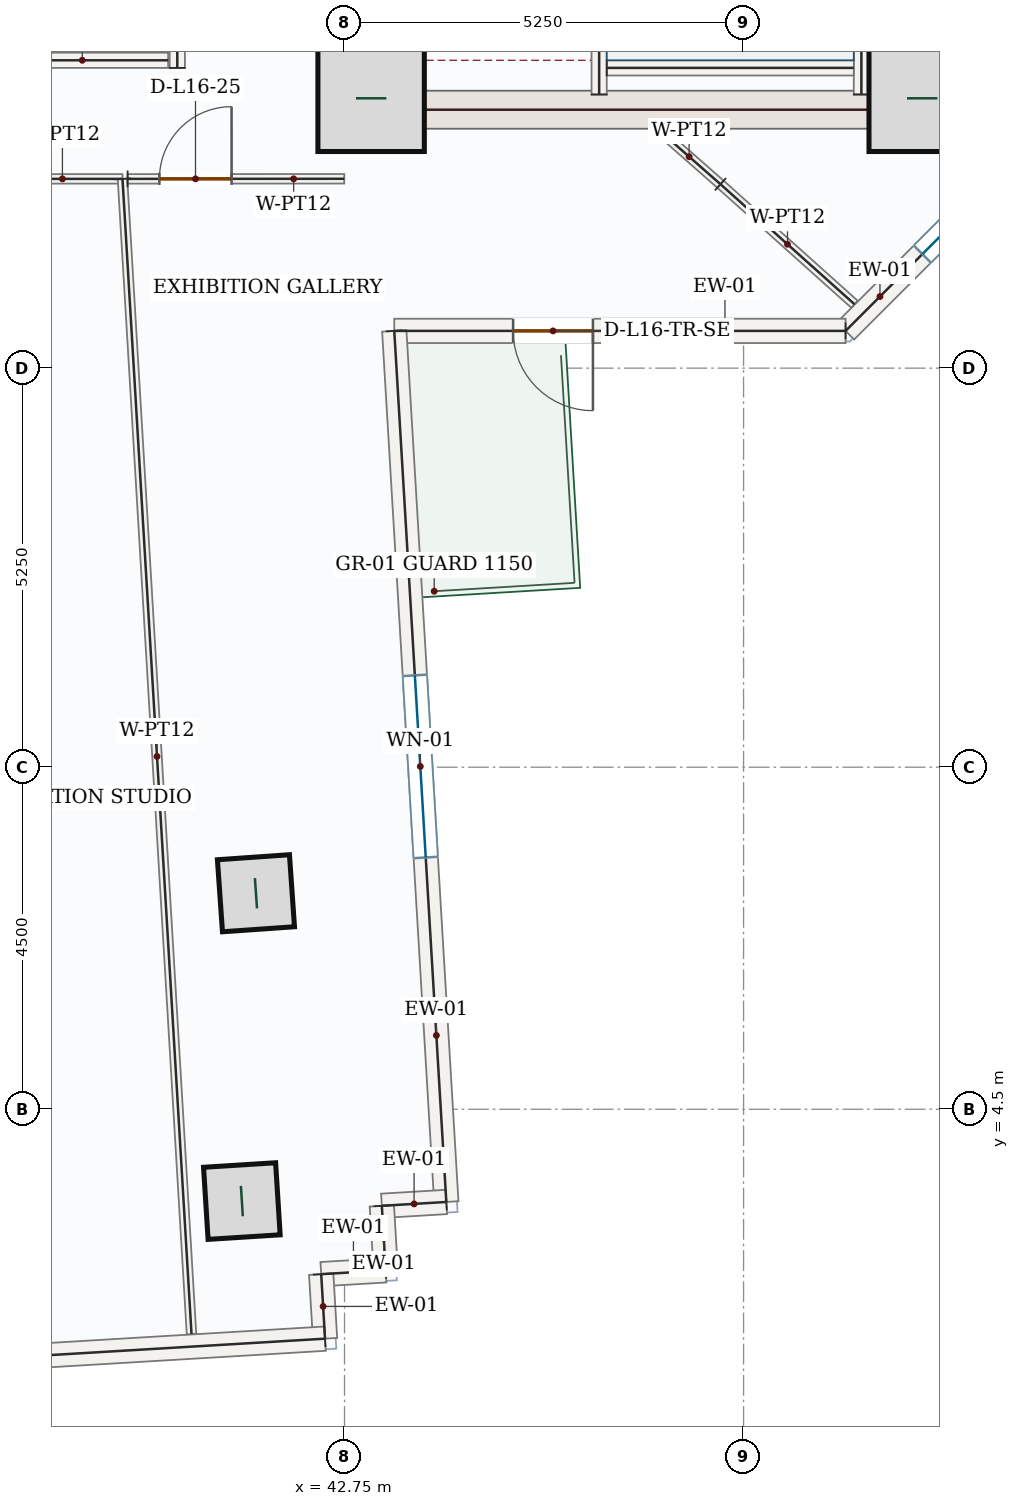
"""IFC4 building model, lengths in metres.
Left out: names, types, materials, properties, quantities, classifications, styles, units other than length and angle.
Written with IfcOpenShell. Run it as: python <this file> out.ifc"""

import sys

from ifc_helpers import new_model, si_unit, direction, frame, frame_2d, origin, origin_2d, place, context, subcontext, project, spatial, rectangle, hollow_rectangle, extrude, source, transform, mapped, element, fill, save


model = new_model("IFC4")
c1 = context("Model", 3, precision=1e-05, world=origin(), true_north=direction((0.0, 1.0)))
c2 = subcontext(c1, "Body", "Model", "MODEL_VIEW")
j1 = project(units=[si_unit("LENGTHUNIT", "METRE"), si_unit("PLANEANGLEUNIT", "RADIAN")], contexts=[c1])
p1 = place(None, origin())
s1 = spatial("IfcSite", under=j1, at=p1, CompositionType="ELEMENT")
p2 = place(p1, origin())
s2 = spatial("IfcBuilding", under=s1, at=p2, CompositionType="ELEMENT")
p3 = place(p2, frame((0.0, 0.0, 75.3)))
s3 = spatial("IfcBuildingStorey", under=s2, at=p3, CompositionType="ELEMENT", Elevation=75.3)
p4 = place(p3, frame((43.0, 17.4, 0.0), z_axis=(0.0, 0.0, 1.0), x_axis=(0.0, 1.0, 0.0)))
e1 = element("IfcWall", 1, at=p4, inside=s3, PredefinedType="SHEAR", context=c2, shape_type="SweptSolid", body=[
    extrude(rectangle(XDim=8.55, YDim=0.5, at=frame_2d((4.275, 0.0))), origin(), (0.0, 0.0, 1.0), 3.95),
])
p5 = place(p4, frame((6.65, 0.0, 0.0)))
e2 = element("IfcOpeningElement", 2, at=p5, cuts=e1, PredefinedType="OPENING", context=c2, shape_type="SweptSolid", body=[
    extrude(rectangle(XDim=1.1, YDim=2.2, at=frame_2d((0.55, 1.1))), frame((0.0, 0.26, 0.0), z_axis=(0.0, -1.0, 0.0), x_axis=(1.0, 0.0, 0.0)), (0.0, 0.0, 1.0), 0.52),
])
p6 = place(p4, frame((1.75, 0.0, 0.0)))
e3 = element("IfcOpeningElement", 3, at=p6, cuts=e1, PredefinedType="OPENING", context=c2, shape_type="SweptSolid", body=[
    extrude(rectangle(XDim=1.3, YDim=2.2, at=frame_2d((0.65, 1.1))), frame((0.0, 0.26, 0.0), z_axis=(0.0, -1.0, 0.0), x_axis=(1.0, 0.0, 0.0)), (0.0, 0.0, 1.0), 0.52),
])
p7 = place(p4, frame((4.55, 0.0, 0.0)))
e4 = element("IfcOpeningElement", 4, at=p7, cuts=e1, PredefinedType="OPENING", context=c2, shape_type="SweptSolid", body=[
    extrude(rectangle(XDim=0.88, YDim=2.1, at=frame_2d((0.44, 1.05))), frame((0.0, 0.26, 0.0), z_axis=(0.0, -1.0, 0.0), x_axis=(1.0, 0.0, 0.0)), (0.0, 0.0, 1.0), 0.52),
])
m1 = source(origin(), c2, "Body", "SweptSolid", [
    extrude(rectangle(XDim=8.55, YDim=0.5, at=frame_2d((4.275, 0.0))), origin(), (0.0, 0.0, 1.0), 3.95),
])
p8 = place(p3, frame((50.5, 17.4, 0.0), z_axis=(0.0, 0.0, 1.0), x_axis=(0.0, 1.0, 0.0)))
e5 = element("IfcWall", 5, at=p8, inside=s3, PredefinedType="SHEAR", context=c2, shape_type="MappedRepresentation", body=[
    mapped(m1, transform((0.0, 0.0, 0.0), x_axis=(1.0, 0.0, 0.0), y_axis=(0.0, 1.0, 0.0), z_axis=(0.0, 0.0, 1.0), scale=1.0)),
])
m2 = source(origin(), c2, "Body", "SweptSolid", [
    extrude(rectangle(XDim=7.0, YDim=0.5, at=frame_2d((3.5, 0.0))), origin(), (0.0, 0.0, 1.0), 3.95),
])
p9 = place(p3, frame((43.25, 17.65, 0.0), z_axis=(0.0, 0.0, 1.0), x_axis=(1.0, 0.0, 0.0)))
e6 = element("IfcWall", 6, at=p9, inside=s3, PredefinedType="SHEAR", context=c2, shape_type="MappedRepresentation", body=[
    mapped(m2, transform((0.0, 0.0, 0.0), x_axis=(1.0, 0.0, 0.0), y_axis=(0.0, 1.0, 0.0), z_axis=(0.0, 0.0, 1.0), scale=1.0)),
])
m3 = source(origin(), c2, "Body", "SweptSolid", [
    extrude(rectangle(XDim=1.4, YDim=1.4, at=origin_2d()), origin(), (0.0, 0.0, 1.0), 4.2),
])
for number, where, z_axis, x_axis in (
    (7, (43.1, 17.8, 0.0), (0.0, 0.0, 1.0), (1.0, 0.0, 0.0)),
    (8, (50.35, 17.8, 0.0), (0.0, 0.0, 1.0), (1.0, 0.0, 0.0)),
):
    element("IfcColumn", number, at=place(p3, frame(where, z_axis=z_axis, x_axis=x_axis)), inside=s3, PredefinedType="COLUMN", context=c2, shape_type="MappedRepresentation", body=[
        mapped(m3, transform((0.0, 0.0, 0.0), x_axis=(1.0, 0.0, 0.0), y_axis=(0.0, 1.0, 0.0), z_axis=(0.0, 0.0, 1.0), scale=1.0)),
    ])
m4 = source(origin(), c2, "Body", "SweptSolid", [
    extrude(hollow_rectangle(XDim=0.95, YDim=0.95, WallThickness=0.05, at=origin_2d()), origin(), (0.0, 0.0, 1.0), 4.2),
])
for number, where, z_axis, x_axis in (
    (9, (41.585, 7.342, 0.0), (0.0, 0.0, 1.0), (-0.07, 0.998, 0.0)),
    (10, (41.399, 3.292, 0.0), (0.0, 0.0, 1.0), (-0.063, 0.998, 0.0)),
):
    element("IfcColumn", number, at=place(p3, frame(where, z_axis=z_axis, x_axis=x_axis)), inside=s3, PredefinedType="COLUMN", context=c2, shape_type="MappedRepresentation", body=[
        mapped(m4, transform((0.0, 0.0, 0.0), x_axis=(1.0, 0.0, 0.0), y_axis=(0.0, 1.0, 0.0), z_axis=(0.0, 0.0, 1.0), scale=1.0)),
    ])
p10 = place(p3, frame((53.06, 18.458, 0.0), z_axis=(0.0, 0.0, 1.0), x_axis=(-0.707106781187, -0.707106781187, 0.0)))
e11 = element("IfcWall", 11, at=p10, inside=s3, PredefinedType="SOLIDWALL", context=c2, shape_type="SweptSolid", body=[
    extrude(rectangle(XDim=5.258, YDim=0.32, at=frame_2d((2.629, 0.0))), origin(), (0.0, 0.0, 1.0), 3.95),
])
p11 = place(p10, frame((1.429, 0.0, 0.85)))
e12 = element("IfcOpeningElement", 12, at=p11, cuts=e11, PredefinedType="OPENING", context=c2, shape_type="SweptSolid", body=[
    extrude(rectangle(XDim=2.4, YDim=1.8, at=frame_2d((1.2, 0.9))), frame((0.0, 0.17, 0.0), z_axis=(0.0, -1.0, 0.0), x_axis=(1.0, 0.0, 0.0)), (0.0, 0.0, 1.0), 0.34),
])
p12 = place(p3, frame((49.342, 14.74, 0.0), z_axis=(0.0, 0.0, 1.0), x_axis=(-1.0, 0.0, 0.0)))
e13 = element("IfcWall", 13, at=p12, inside=s3, PredefinedType="SOLIDWALL", context=c2, shape_type="SweptSolid", body=[
    extrude(rectangle(XDim=5.938, YDim=0.32, at=frame_2d((2.969, 0.0))), origin(), (0.0, 0.0, 1.0), 3.95),
])
p13 = place(p12, frame((3.324, 0.0, 0.0)))
e14 = element("IfcOpeningElement", 14, at=p13, cuts=e13, PredefinedType="OPENING", context=c2, shape_type="SweptSolid", body=[
    extrude(rectangle(XDim=1.05, YDim=2.15, at=frame_2d((0.525, 1.075))), frame((0.0, 0.17, 0.0), z_axis=(0.0, -1.0, 0.0), x_axis=(1.0, 0.0, 0.0)), (0.0, 0.0, 1.0), 0.34),
])
p14 = place(p3, frame((43.405, 14.74, 0.0), z_axis=(0.0, 0.0, 1.0), x_axis=(0.059651994121, -0.998219234235, 0.0)))
e15 = element("IfcWall", 15, at=p14, inside=s3, PredefinedType="SOLIDWALL", context=c2, shape_type="SweptSolid", body=[
    extrude(rectangle(XDim=11.48, YDim=0.32, at=frame_2d((5.74, 0.0))), origin(), (0.0, 0.0, 1.0), 3.95),
])
p15 = place(p14, frame((4.54, 0.0, 0.85)))
e16 = element("IfcOpeningElement", 16, at=p15, cuts=e15, PredefinedType="OPENING", context=c2, shape_type="SweptSolid", body=[
    extrude(rectangle(XDim=2.4, YDim=1.8, at=frame_2d((1.2, 0.9))), frame((0.0, 0.17, 0.0), z_axis=(0.0, -1.0, 0.0), x_axis=(1.0, 0.0, 0.0)), (0.0, 0.0, 1.0), 0.34),
])
m5 = source(origin(), c2, "Body", "SweptSolid", [
    extrude(rectangle(XDim=0.85, YDim=0.32, at=frame_2d((0.425, 0.0))), origin(), (0.0, 0.0, 1.0), 3.95),
])
for number, where, z_axis, x_axis in (
    (17, (44.089, 3.28, 0.0), (0.0, 0.0, 1.0), (-0.998, -0.06, 0.0)),
    (18, (43.241, 3.229, 0.0), (0.0, 0.0, 1.0), (0.059, -0.998, 0.0)),
    (19, (43.292, 2.381, 0.0), (0.0, 0.0, 1.0), (-0.998, -0.06, 0.0)),
    (20, (42.443, 2.33, 0.0), (0.0, 0.0, 1.0), (0.06, -0.998, 0.0)),
):
    element("IfcWall", number, at=place(p3, frame(where, z_axis=z_axis, x_axis=x_axis)), inside=s3, PredefinedType="SOLIDWALL", context=c2, shape_type="MappedRepresentation", body=[
        mapped(m5, transform((0.0, 0.0, 0.0), x_axis=(1.0, 0.0, 0.0), y_axis=(0.0, 1.0, 0.0), z_axis=(0.0, 0.0, 1.0), scale=1.0)),
    ])
m6 = source(origin(), c2, "Body", "SweptSolid", [
    extrude(rectangle(XDim=9.92, YDim=0.32, at=frame_2d((4.96, 0.0))), origin(), (0.0, 0.0, 1.0), 3.95),
])
p16 = place(p3, frame((42.494, 1.482, 0.0), z_axis=(0.0, 0.0, 1.0), x_axis=(-0.998218942745, -0.059656871726, 0.0)))
e21 = element("IfcWall", 21, at=p16, inside=s3, PredefinedType="SOLIDWALL", context=c2, shape_type="MappedRepresentation", body=[
    mapped(m6, transform((0.0, 0.0, 0.0), x_axis=(1.0, 0.0, 0.0), y_axis=(0.0, 1.0, 0.0), z_axis=(0.0, 0.0, 1.0), scale=1.0)),
])
m7 = source(origin(), c2, "Body", "SweptSolid", [
    extrude(rectangle(XDim=7.87, YDim=0.2, at=frame_2d((3.935, 0.0))), origin(), (0.0, 0.0, 1.0), 3.95),
])
p17 = place(p3, frame((49.55, 17.85, 0.0), z_axis=(0.0, 0.0, 1.0), x_axis=(0.0, 1.0, 0.0)))
e22 = element("IfcWall", 22, at=p17, inside=s3, PredefinedType="SOLIDWALL", context=c2, shape_type="MappedRepresentation", body=[
    mapped(m7, transform((0.0, 0.0, 0.0), x_axis=(1.0, 0.0, 0.0), y_axis=(0.0, 1.0, 0.0), z_axis=(0.0, 0.0, 1.0), scale=1.0)),
])
p18 = place(p3, frame((46.1, 17.85, 0.0), z_axis=(0.0, 0.0, 1.0), x_axis=(0.0, 1.0, 0.0)))
e23 = element("IfcWall", 23, at=p18, inside=s3, PredefinedType="SOLIDWALL", context=c2, shape_type="SweptSolid", body=[
    extrude(rectangle(XDim=8.0, YDim=0.2, at=frame_2d((4.0, 0.0))), origin(), (0.0, 0.0, 1.0), 3.95),
])
p19 = place(p18, frame((6.3, 0.0, 0.0)))
e24 = element("IfcOpeningElement", 24, at=p19, cuts=e23, PredefinedType="OPENING", context=c2, shape_type="SweptSolid", body=[
    extrude(rectangle(XDim=1.05, YDim=2.15, at=frame_2d((0.525, 1.075))), frame((0.0, 0.11, 0.0), z_axis=(0.0, -1.0, 0.0), x_axis=(1.0, 0.0, 0.0)), (0.0, 0.0, 1.0), 0.22),
])
m8 = source(origin(), c2, "Body", "SweptSolid", [
    extrude(rectangle(XDim=3.25, YDim=0.2, at=frame_2d((1.625, 0.0))), origin(), (0.0, 0.0, 1.0), 3.95),
])
p20 = place(p3, frame((46.2, 18.2, 0.0), z_axis=(0.0, 0.0, 1.0), x_axis=(1.0, 0.0, 0.0)))
e25 = element("IfcWall", 25, at=p20, inside=s3, PredefinedType="SOLIDWALL", context=c2, shape_type="MappedRepresentation", body=[
    mapped(m8, transform((0.0, 0.0, 0.0), x_axis=(1.0, 0.0, 0.0), y_axis=(0.0, 1.0, 0.0), z_axis=(0.0, 0.0, 1.0), scale=1.0)),
])
m9 = source(origin(), c2, "Body", "SweptSolid", [
    extrude(rectangle(XDim=2.35, YDim=0.2, at=frame_2d((1.175, 0.0))), origin(), (0.0, 0.0, 1.0), 3.95),
])
p21 = place(p3, frame((40.55, 18.2, 0.0), z_axis=(0.0, 0.0, 1.0), x_axis=(0.0, 1.0, 0.0)))
e26 = element("IfcWall", 26, at=p21, inside=s3, PredefinedType="SOLIDWALL", context=c2, shape_type="MappedRepresentation", body=[
    mapped(m9, transform((0.0, 0.0, 0.0), x_axis=(1.0, 0.0, 0.0), y_axis=(0.0, 1.0, 0.0), z_axis=(0.0, 0.0, 1.0), scale=1.0)),
])
m10 = source(origin(), c2, "Body", "SweptSolid", [
    extrude(rectangle(XDim=2.26, YDim=0.2, at=frame_2d((1.13, 0.0))), origin(), (0.0, 0.0, 1.0), 3.95),
])
p22 = place(p3, frame((38.17, 18.3, 0.0), z_axis=(0.0, 0.0, 1.0), x_axis=(1.0, 0.0, 0.0)))
e27 = element("IfcWall", 27, at=p22, inside=s3, PredefinedType="SOLIDWALL", context=c2, shape_type="MappedRepresentation", body=[
    mapped(m10, transform((0.0, 0.0, 0.0), x_axis=(1.0, 0.0, 0.0), y_axis=(0.0, 1.0, 0.0), z_axis=(0.0, 0.0, 1.0), scale=1.0)),
])
p23 = place(p3, frame((36.661, 16.74, 0.0), z_axis=(0.0, 0.0, 1.0), x_axis=(1.0, 0.0, 0.0)))
e28 = element("IfcWall", 28, at=p23, inside=s3, PredefinedType="PARTITIONING", context=c2, shape_type="SweptSolid", body=[
    extrude(rectangle(XDim=3.168, YDim=0.125, at=frame_2d((1.584, 0.0))), origin(), (0.0, 0.0, 1.0), 3.95),
])
p24 = place(p23, frame((0.488, 0.0, 0.0)))
e29 = element("IfcOpeningElement", 29, at=p24, cuts=e28, PredefinedType="OPENING", context=c2, shape_type="SweptSolid", body=[
    extrude(rectangle(XDim=0.95, YDim=2.15, at=frame_2d((0.475, 1.075))), frame((0.0, 0.073, 0.0), z_axis=(0.0, -1.0, 0.0), x_axis=(1.0, 0.0, 0.0)), (0.0, 0.0, 1.0), 0.145),
])
m11 = source(origin(), c2, "Body", "SweptSolid", [
    extrude(rectangle(XDim=15.225, YDim=0.125, at=frame_2d((7.612, 0.0))), origin(), (0.0, 0.0, 1.0), 3.95),
])
p25 = place(p3, frame((39.829, 16.74, 0.0), z_axis=(0.0, 0.0, 1.0), x_axis=(0.059652617074, -0.998219197008, 0.0)))
e30 = element("IfcWall", 30, at=p25, inside=s3, PredefinedType="PARTITIONING", context=c2, shape_type="MappedRepresentation", body=[
    mapped(m11, transform((0.0, 0.0, 0.0), x_axis=(1.0, 0.0, 0.0), y_axis=(0.0, 1.0, 0.0), z_axis=(0.0, 0.0, 1.0), scale=1.0)),
])
p26 = place(p3, frame((39.896, 16.74, 0.0), z_axis=(0.0, 0.0, 1.0), x_axis=(0.999999908279, 0.000428302171, 0.0)))
e31 = element("IfcWall", 31, at=p26, inside=s3, PredefinedType="PARTITIONING", context=c2, shape_type="SweptSolid", body=[
    extrude(rectangle(XDim=2.85, YDim=0.125, at=frame_2d((1.425, 0.0))), origin(), (0.0, 0.0, 1.0), 3.95),
])
p27 = place(p26, frame((0.418, 0.0, 0.0)))
e32 = element("IfcOpeningElement", 32, at=p27, cuts=e31, PredefinedType="OPENING", context=c2, shape_type="SweptSolid", body=[
    extrude(rectangle(XDim=0.95, YDim=2.15, at=frame_2d((0.475, 1.075))), frame((0.0, 0.073, 0.0), z_axis=(0.0, -1.0, 0.0), x_axis=(1.0, 0.0, 0.0)), (0.0, 0.0, 1.0), 0.145),
])
m12 = source(origin(), c2, "Body", "SweptSolid", [
    extrude(rectangle(XDim=1.099, YDim=0.125, at=frame_2d((0.549, 0.0))), origin(), (0.0, 0.0, 1.0), 3.95),
])
p28 = place(p3, frame((46.871, 17.395, 0.0), z_axis=(0.0, 0.0, 1.0), x_axis=(0.750977912422, -0.660327324177, 0.0)))
e33 = element("IfcWall", 33, at=p28, inside=s3, PredefinedType="PARTITIONING", context=c2, shape_type="MappedRepresentation", body=[
    mapped(m12, transform((0.0, 0.0, 0.0), x_axis=(1.0, 0.0, 0.0), y_axis=(0.0, 1.0, 0.0), z_axis=(0.0, 0.0, 1.0), scale=1.0)),
])
m13 = source(origin(), c2, "Body", "SweptSolid", [
    extrude(rectangle(XDim=2.367, YDim=0.125, at=frame_2d((1.183, 0.0))), origin(), (0.0, 0.0, 1.0), 3.95),
])
p29 = place(p3, frame((47.696, 16.669, 0.0), z_axis=(0.0, 0.0, 1.0), x_axis=(0.744928255706, -0.667144582419, 0.0)))
e34 = element("IfcWall", 34, at=p29, inside=s3, PredefinedType="PARTITIONING", context=c2, shape_type="MappedRepresentation", body=[
    mapped(m13, transform((0.0, 0.0, 0.0), x_axis=(1.0, 0.0, 0.0), y_axis=(0.0, 1.0, 0.0), z_axis=(0.0, 0.0, 1.0), scale=1.0)),
])
m14 = source(origin(), c2, "Body", "SweptSolid", [
    extrude(rectangle(XDim=2.4, YDim=1.8, at=frame_2d((1.2, 0.9))), frame((0.0, 0.03, 0.0), z_axis=(0.0, -1.0, 0.0), x_axis=(1.0, 0.0, 0.0)), (0.0, 0.0, 1.0), 0.06),
])
p30 = place(p11, origin())
e35 = element("IfcWindow", 35, at=p30, inside=s3, PartitioningType="DOUBLE_PANEL_VERTICAL", PredefinedType="WINDOW", context=c2, shape_type="MappedRepresentation", body=[
    mapped(m14, transform((0.0, 0.0, 0.0), x_axis=(1.0, 0.0, 0.0), y_axis=(0.0, 1.0, 0.0), z_axis=(0.0, 0.0, 1.0), scale=1.0)),
])
fill(e12, e35)
m15 = source(origin(), c2, "Body", "SweptSolid", [
    extrude(rectangle(XDim=1.05, YDim=2.15, at=frame_2d((0.525, 1.075))), frame((0.0, 0.025, 0.0), z_axis=(0.0, -1.0, 0.0), x_axis=(1.0, 0.0, 0.0)), (0.0, 0.0, 1.0), 0.05),
])
p31 = place(p13, origin())
e36 = element("IfcDoor", 36, at=p31, inside=s3, OperationType="SINGLE_SWING_LEFT", PredefinedType="DOOR", context=c2, shape_type="MappedRepresentation", body=[
    mapped(m15, transform((0.0, 0.0, 0.0), x_axis=(1.0, 0.0, 0.0), y_axis=(0.0, 1.0, 0.0), z_axis=(0.0, 0.0, 1.0), scale=1.0)),
])
fill(e14, e36)
p32 = place(p15, origin())
e37 = element("IfcWindow", 37, at=p32, inside=s3, PartitioningType="DOUBLE_PANEL_VERTICAL", PredefinedType="WINDOW", context=c2, shape_type="MappedRepresentation", body=[
    mapped(m14, transform((0.0, 0.0, 0.0), x_axis=(1.0, 0.0, 0.0), y_axis=(0.0, 1.0, 0.0), z_axis=(0.0, 0.0, 1.0), scale=1.0)),
])
fill(e16, e37)
m16 = source(origin(), c2, "Body", "SweptSolid", [
    extrude(rectangle(XDim=0.95, YDim=2.15, at=frame_2d((0.475, 1.075))), frame((0.0, 0.025, 0.0), z_axis=(0.0, -1.0, 0.0), x_axis=(1.0, 0.0, 0.0)), (0.0, 0.0, 1.0), 0.05),
])
p33 = place(p27, origin())
e38 = element("IfcDoor", 38, at=p33, inside=s3, OperationType="SINGLE_SWING_RIGHT", PredefinedType="DOOR", context=c2, shape_type="MappedRepresentation", body=[
    mapped(m16, transform((0.0, 0.0, 0.0), x_axis=(1.0, 0.0, 0.0), y_axis=(0.0, 1.0, 0.0), z_axis=(0.0, 0.0, 1.0), scale=1.0)),
])
fill(e32, e38)
save(model, sys.argv[1])
